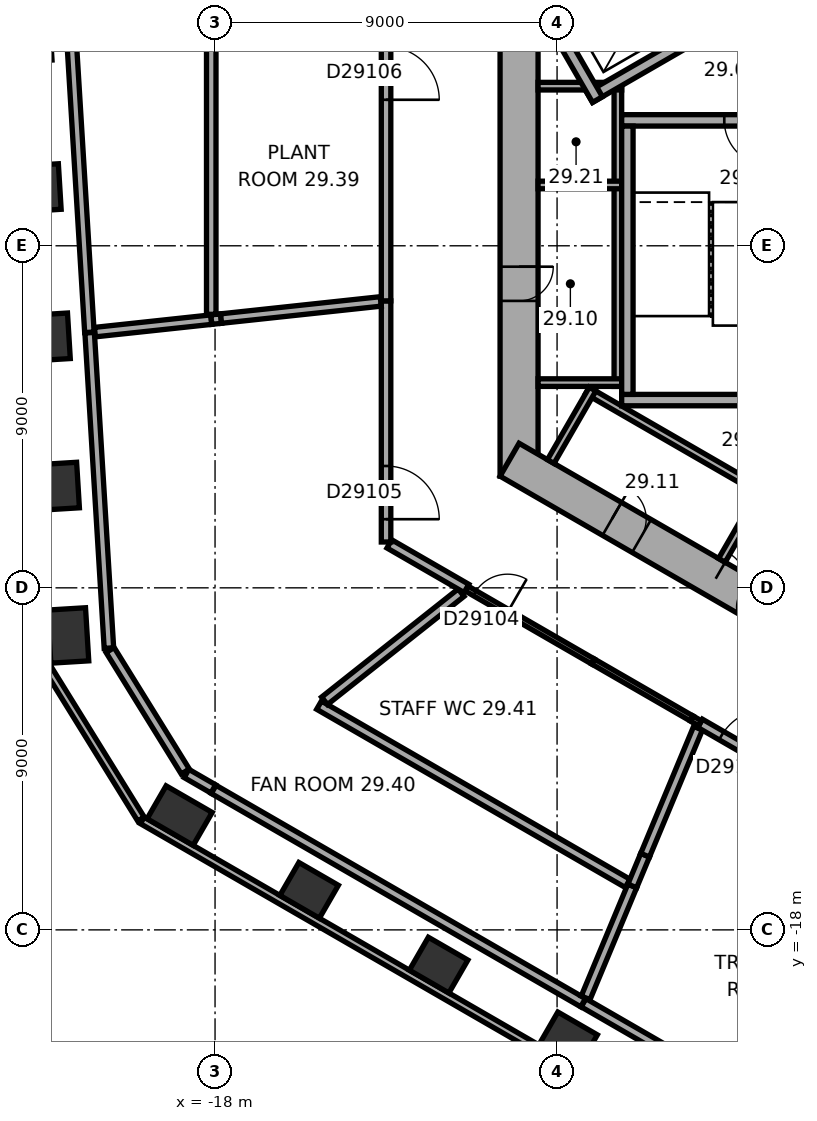
"""IFC4 building model, lengths in metres.
Left out: names, types, materials, properties, quantities, classifications, styles, units other than length and angle.
Written with IfcOpenShell. Run it as: python <this file> out.ifc"""

import sys

from ifc_helpers import new_model, si_unit, direction, frame, frame_2d, origin, origin_2d, place, context, subcontext, project, spatial, rectangle, extrude, element, fill, save


model = new_model("IFC4")
c1 = context("Model", 3, precision=1e-05, world=origin(), true_north=direction((0.0, 1.0)))
c2 = subcontext(c1, "Body", "Model", "MODEL_VIEW")
j1 = project(units=[si_unit("LENGTHUNIT", "METRE"), si_unit("PLANEANGLEUNIT", "RADIAN")], contexts=[c1])
p1 = place(None, origin())
s1 = spatial("IfcSite", under=j1, at=p1, CompositionType="ELEMENT")
p2 = place(p1, origin())
s2 = spatial("IfcBuilding", under=s1, at=p2, CompositionType="ELEMENT")
p3 = place(p2, frame((0.0, 0.0, 119.9)))
s3 = spatial("IfcBuildingStorey", under=s2, at=p3, CompositionType="ELEMENT", Elevation=119.9)
for number, where, z_axis, x_axis in (
    (1, (-22.826, 5.456, 0.0), (0.0, 0.0, 1.0), (0.061, -0.998, 0.0)),
    (2, (-22.585, 1.529, 0.0), (0.0, 0.0, 1.0), (0.061, -0.998, 0.0)),
    (3, (-22.345, -2.399, 0.0), (0.0, 0.0, 1.0), (0.061, -0.998, 0.0)),
    (4, (-22.105, -6.326, 0.0), (0.0, 0.0, 1.0), (0.061, -0.998, 0.0)),
):
    element("IfcColumn", number, at=place(p3, frame(where, z_axis=z_axis, x_axis=x_axis)), inside=s3, PredefinedType="COLUMN", context=c2, shape_type="SweptSolid", body=[
        extrude(rectangle(XDim=1.2, YDim=1.0, at=origin_2d()), origin(), (0.0, 0.0, 1.0), 4.5),
    ])
for number, where, z_axis, x_axis in (
    (5, (-21.865, -10.253, 0.0), (0.0, 0.0, 1.0), (0.061, -0.998, 0.0)),
    (6, (-18.932, -14.993, 0.0), (0.0, 0.0, 1.0), (0.866, -0.5, 0.0)),
):
    element("IfcColumn", number, at=place(p3, frame(where, z_axis=z_axis, x_axis=x_axis)), inside=s3, PredefinedType="COLUMN", context=c2, shape_type="SweptSolid", body=[
        extrude(rectangle(XDim=1.4, YDim=1.0, at=origin_2d()), origin(), (0.0, 0.0, 1.0), 4.5),
    ])
for number, where, z_axis, x_axis in (
    (7, (-15.524, -16.96, 0.0), (0.0, 0.0, 1.0), (0.866, -0.5, 0.0)),
    (8, (-12.117, -18.927, 0.0), (0.0, 0.0, 1.0), (0.866, -0.5, 0.0)),
    (9, (-8.71, -20.895, 0.0), (0.0, 0.0, 1.0), (0.866, -0.5, 0.0)),
):
    element("IfcColumn", number, at=place(p3, frame(where, z_axis=z_axis, x_axis=x_axis)), inside=s3, PredefinedType="COLUMN", context=c2, shape_type="SweptSolid", body=[
        extrude(rectangle(XDim=1.2, YDim=1.0, at=origin_2d()), origin(), (0.0, 0.0, 1.0), 4.5),
    ])
p4 = place(p3, frame((-10.0, 6.062, 0.0), z_axis=(0.0, 0.0, 1.0), x_axis=(0.0, -1.0, 0.0)))
e10 = element("IfcWall", 10, at=p4, inside=s3, PredefinedType="SHEAR", context=c2, shape_type="SweptSolid", body=[
    extrude(rectangle(XDim=12.125, YDim=1.0, at=frame_2d((6.062, 0.0))), origin(), (0.0, 0.0, 1.0), 4.5),
])
p5 = place(p4, frame((6.612, 0.0, 0.0)))
e11 = element("IfcOpeningElement", 11, at=p5, cuts=e10, PredefinedType="OPENING", context=c2, shape_type="SweptSolid", body=[
    extrude(rectangle(XDim=0.9, YDim=2.1, at=frame_2d((0.45, 1.05))), frame((0.0, 0.51, 0.0), z_axis=(0.0, -1.0, 0.0), x_axis=(1.0, 0.0, 0.0)), (0.0, 0.0, 1.0), 1.02),
])
p6 = place(p3, frame((-10.25, -5.629, 0.0), z_axis=(0.0, 0.0, 1.0), x_axis=(0.866022616891, -0.50000482701, 0.0)))
e12 = element("IfcWall", 12, at=p6, inside=s3, PredefinedType="SHEAR", context=c2, shape_type="SweptSolid", body=[
    extrude(rectangle(XDim=12.125, YDim=1.0, at=frame_2d((6.062, 0.0))), origin(), (0.0, 0.0, 1.0), 4.5),
])
p7 = place(p6, frame((6.262, 0.0, 0.0)))
e13 = element("IfcOpeningElement", 13, at=p7, cuts=e12, PredefinedType="OPENING", context=c2, shape_type="SweptSolid", body=[
    extrude(rectangle(XDim=1.5, YDim=2.1, at=frame_2d((0.75, 1.05))), frame((0.0, 0.51, 0.0), z_axis=(0.0, -1.0, 0.0), x_axis=(1.0, 0.0, 0.0)), (0.0, 0.0, 1.0), 1.02),
])
p8 = place(p6, frame((3.112, 0.0, 0.0)))
e14 = element("IfcOpeningElement", 14, at=p8, cuts=e12, PredefinedType="OPENING", context=c2, shape_type="SweptSolid", body=[
    extrude(rectangle(XDim=0.9, YDim=2.1, at=frame_2d((0.45, 1.05))), frame((0.0, 0.51, 0.0), z_axis=(0.0, -1.0, 0.0), x_axis=(1.0, 0.0, 0.0)), (0.0, 0.0, 1.0), 1.02),
])
p9 = place(p3, frame((-22.401, -11.122, 0.0), z_axis=(0.0, 0.0, 1.0), x_axis=(0.526197679914, -0.850362276711, 0.0)))
e15 = element("IfcWall", 15, at=p9, inside=s3, PredefinedType="STANDARD", context=c2, shape_type="SweptSolid", body=[
    extrude(rectangle(XDim=4.66, YDim=0.2, at=frame_2d((2.33, 0.0))), origin(), (0.0, 0.0, 1.0), 4.5),
])
p10 = place(p3, frame((-19.914, -15.119, 0.0), z_axis=(0.0, 0.0, 1.0), x_axis=(0.866025418898, -0.499999973822, 0.0)))
e16 = element("IfcWall", 16, at=p10, inside=s3, PredefinedType="STANDARD", context=c2, shape_type="SweptSolid", body=[
    extrude(rectangle(XDim=21.246, YDim=0.2, at=frame_2d((10.623, 0.0))), origin(), (0.0, 0.0, 1.0), 4.5),
])
p11 = place(p3, frame((-7.4, 4.3, 0.0), z_axis=(0.0, 0.0, 1.0), x_axis=(0.0, -1.0, 0.0)))
e17 = element("IfcWall", 17, at=p11, inside=s3, PredefinedType="PARTITIONING", context=c2, shape_type="SweptSolid", body=[
    extrude(rectangle(XDim=8.0, YDim=0.2, at=frame_2d((4.0, 0.0))), origin(), (0.0, 0.0, 1.0), 4.22),
])
for number, where, z_axis, x_axis in (
    (18, (-7.3, 4.2, 0.0), (0.0, 0.0, 1.0), (-1.0, 0.0, 0.0)),
    (19, (-7.3, 1.6, 0.0), (0.0, 0.0, 1.0), (-1.0, 0.0, 0.0)),
    (20, (-7.3, -3.6, 0.0), (0.0, 0.0, 1.0), (-1.0, 0.0, 0.0)),
):
    element("IfcWall", number, at=place(p3, frame(where, z_axis=z_axis, x_axis=x_axis)), inside=s3, PredefinedType="PARTITIONING", context=c2, shape_type="SweptSolid", body=[
        extrude(rectangle(XDim=2.2, YDim=0.2, at=frame_2d((1.1, 0.0))), origin(), (0.0, 0.0, 1.0), 4.22),
    ])
p12 = place(p3, frame((-8.203, -3.809, 0.0), z_axis=(0.0, 0.0, 1.0), x_axis=(0.866028230842, -0.499995103361, 0.0)))
e21 = element("IfcWall", 21, at=p12, inside=s3, PredefinedType="PARTITIONING", context=c2, shape_type="SweptSolid", body=[
    extrude(rectangle(XDim=5.4, YDim=0.2, at=frame_2d((2.7, 0.0))), origin(), (0.0, 0.0, 1.0), 4.22),
])
p13 = place(p3, frame((-8.067, -3.772, 0.0), z_axis=(0.0, 0.0, 1.0), x_axis=(-0.50002983664, -0.866008176907, 0.0)))
e22 = element("IfcWall", 22, at=p13, inside=s3, PredefinedType="PARTITIONING", context=c2, shape_type="SweptSolid", body=[
    extrude(rectangle(XDim=2.2, YDim=0.2, at=frame_2d((1.1, 0.0))), origin(), (0.0, 0.0, 1.0), 4.22),
])
p14 = place(p3, frame((-3.563, -6.372, 0.0), z_axis=(0.0, 0.0, 1.0), x_axis=(-0.499994660107, -0.866028486751, 0.0)))
e23 = element("IfcWall", 23, at=p14, inside=s3, PredefinedType="PARTITIONING", context=c2, shape_type="SweptSolid", body=[
    extrude(rectangle(XDim=2.2, YDim=0.2, at=frame_2d((1.1, 0.0))), origin(), (0.0, 0.0, 1.0), 4.22),
])
p15 = place(p3, frame((-2.6, 3.3, 0.0), z_axis=(0.0, 0.0, 1.0), x_axis=(-1.0, 0.0, 0.0)))
e24 = element("IfcWall", 24, at=p15, inside=s3, PredefinedType="SHEAR", context=c2, shape_type="SweptSolid", body=[
    extrude(rectangle(XDim=4.7, YDim=0.3, at=frame_2d((2.35, 0.0))), origin(), (0.0, 0.0, 1.0), 4.22),
])
p16 = place(p15, frame((0.8, 0.0, 0.0)))
e25 = element("IfcOpeningElement", 25, at=p16, cuts=e24, PredefinedType="OPENING", context=c2, shape_type="SweptSolid", body=[
    extrude(rectangle(XDim=1.2, YDim=2.1, at=frame_2d((0.6, 1.05))), frame((0.0, 0.16, 0.0), z_axis=(0.0, -1.0, 0.0), x_axis=(1.0, 0.0, 0.0)), (0.0, 0.0, 1.0), 0.32),
])
p17 = place(p3, frame((-2.6, -4.06, 0.0), z_axis=(0.0, 0.0, 1.0), x_axis=(-1.0, 0.0, 0.0)))
e26 = element("IfcWall", 26, at=p17, inside=s3, PredefinedType="SHEAR", context=c2, shape_type="SweptSolid", body=[
    extrude(rectangle(XDim=4.7, YDim=0.3, at=frame_2d((2.35, 0.0))), origin(), (0.0, 0.0, 1.0), 4.22),
])
p18 = place(p3, frame((-7.15, 3.15, 0.0), z_axis=(0.0, 0.0, 1.0), x_axis=(0.0, -1.0, 0.0)))
e27 = element("IfcWall", 27, at=p18, inside=s3, PredefinedType="SHEAR", context=c2, shape_type="SweptSolid", body=[
    extrude(rectangle(XDim=7.06, YDim=0.3, at=frame_2d((3.53, 0.0))), origin(), (0.0, 0.0, 1.0), 4.22),
])
p19 = place(p3, frame((-5.24, 5.577, 0.0), z_axis=(0.0, 0.0, 1.0), x_axis=(-0.866014461049, -0.500018952895, 0.0)))
e28 = element("IfcWall", 28, at=p19, inside=s3, PredefinedType="SHEAR", context=c2, shape_type="SweptSolid", body=[
    extrude(rectangle(XDim=3.35, YDim=0.3, at=frame_2d((1.675, 0.0))), origin(), (0.0, 0.0, 1.0), 4.22),
])
p20 = place(p3, frame((-7.937, 3.847, 0.0), z_axis=(0.0, 0.0, 1.0), x_axis=(-0.50002983664, 0.866008176907, 0.0)))
e29 = element("IfcWall", 29, at=p20, inside=s3, PredefinedType="SHEAR", context=c2, shape_type="SweptSolid", body=[
    extrude(rectangle(XDim=2.2, YDim=0.3, at=frame_2d((1.1, 0.0))), origin(), (0.0, 0.0, 1.0), 4.22),
])
p21 = place(p3, frame((-1.071, -24.093, 0.0), z_axis=(0.0, 0.0, 1.0), x_axis=(-0.866026859388, 0.499997478812, 0.0)))
e30 = element("IfcWall", 30, at=p21, inside=s3, PredefinedType="SOLIDWALL", context=c2, shape_type="SweptSolid", body=[
    extrude(rectangle(XDim=8.35, YDim=0.25, at=frame_2d((4.175, 0.0))), origin(), (0.0, 0.0, 1.0), 3.72),
])
p22 = place(p3, frame((-8.315, -19.916, 0.0), z_axis=(0.0, 0.0, 1.0), x_axis=(-0.866035647186, 0.499982257488, 0.0)))
e31 = element("IfcWall", 31, at=p22, inside=s3, PredefinedType="SOLIDWALL", context=c2, shape_type="SweptSolid", body=[
    extrude(rectangle(XDim=11.226, YDim=0.25, at=frame_2d((5.613, 0.0))), origin(), (0.0, 0.0, 1.0), 3.72),
])
p23 = place(p3, frame((-8.249, -19.788, 0.0), z_axis=(0.0, 0.0, 1.0), x_axis=(0.384822050218, 0.922990785255, 0.0)))
e32 = element("IfcWall", 32, at=p23, inside=s3, PredefinedType="SOLIDWALL", context=c2, shape_type="SweptSolid", body=[
    extrude(rectangle(XDim=3.187, YDim=0.25, at=frame_2d((1.594, 0.0))), origin(), (0.0, 0.0, 1.0), 3.2),
])
p24 = place(p3, frame((-7.143, -16.776, 0.0), z_axis=(0.0, 0.0, 1.0), x_axis=(-0.866010407637, 0.500025973189, 0.0)))
e33 = element("IfcWall", 33, at=p24, inside=s3, PredefinedType="SOLIDWALL", context=c2, shape_type="SweptSolid", body=[
    extrude(rectangle(XDim=9.376, YDim=0.25, at=frame_2d((4.688, 0.0))), origin(), (0.0, 0.0, 1.0), 4.22),
])
p25 = place(p3, frame((-6.684, -16.034, 0.0), z_axis=(0.0, 0.0, 1.0), x_axis=(-0.384892223144, -0.922961524964, 0.0)))
e34 = element("IfcWall", 34, at=p25, inside=s3, PredefinedType="SOLIDWALL", context=c2, shape_type="SweptSolid", body=[
    extrude(rectangle(XDim=0.877, YDim=0.25, at=frame_2d((0.438, 0.0))), origin(), (0.0, 0.0, 1.0), 3.2),
])
p26 = place(p3, frame((-6.684, -16.034, 0.0), z_axis=(0.0, 0.0, 1.0), x_axis=(0.384715971376, 0.923035005495, 0.0)))
e35 = element("IfcWall", 35, at=p26, inside=s3, PredefinedType="SOLIDWALL", context=c2, shape_type="SweptSolid", body=[
    extrude(rectangle(XDim=3.619, YDim=0.25, at=frame_2d((1.81, 0.0))), origin(), (0.0, 0.0, 1.0), 3.2),
])
p27 = place(p3, frame((0.0, -15.588, 0.0), z_axis=(0.0, 0.0, 1.0), x_axis=(-0.866023574055, 0.500003169172, 0.0)))
e36 = element("IfcWall", 36, at=p27, inside=s3, PredefinedType="SOLIDWALL", context=c2, shape_type="SweptSolid", body=[
    extrude(rectangle(XDim=6.048, YDim=0.25, at=frame_2d((3.024, 0.0))), origin(), (0.0, 0.0, 1.0), 4.22),
])
p28 = place(p27, frame((3.998, 0.0, 0.0)))
e37 = element("IfcOpeningElement", 37, at=p28, cuts=e36, PredefinedType="OPENING", context=c2, shape_type="SweptSolid", body=[
    extrude(rectangle(XDim=1.4, YDim=2.1, at=frame_2d((0.7, 1.05))), frame((0.0, 0.135, 0.0), z_axis=(0.0, -1.0, 0.0), x_axis=(1.0, 0.0, 0.0)), (0.0, 0.0, 1.0), 0.27),
])
p29 = place(p3, frame((-18.046, -14.292, 0.0), z_axis=(0.0, 0.0, 1.0), x_axis=(-0.865925719893, 0.500172617831, 0.0)))
e38 = element("IfcWall", 38, at=p29, inside=s3, PredefinedType="SOLIDWALL", context=c2, shape_type="SweptSolid", body=[
    extrude(rectangle(XDim=0.814, YDim=0.25, at=frame_2d((0.407, 0.0))), origin(), (0.0, 0.0, 1.0), 4.22),
])
p30 = place(p3, frame((-18.782, -13.833, 0.0), z_axis=(0.0, 0.0, 1.0), x_axis=(-0.526240599462, 0.850335716925, 0.0)))
e39 = element("IfcWall", 39, at=p30, inside=s3, PredefinedType="SOLIDWALL", context=c2, shape_type="SweptSolid", body=[
    extrude(rectangle(XDim=3.76, YDim=0.25, at=frame_2d((1.88, 0.0))), origin(), (0.0, 0.0, 1.0), 4.22),
])
p31 = place(p3, frame((-5.238, -12.564, 0.0), z_axis=(0.0, 0.0, 1.0), x_axis=(-0.866234801039, 0.4996371378, 0.0)))
e40 = element("IfcWall", 40, at=p31, inside=s3, PredefinedType="PARTITIONING", context=c2, shape_type="SweptSolid", body=[
    extrude(rectangle(XDim=0.248, YDim=0.15, at=frame_2d((0.124, 0.0))), origin(), (0.0, 0.0, 1.0), 4.22),
])
p32 = place(p3, frame((-5.452, -12.441, 0.0), z_axis=(0.0, 0.0, 1.0), x_axis=(-0.866037998184, 0.499978185225, 0.0)))
e41 = element("IfcWall", 41, at=p32, inside=s3, PredefinedType="PARTITIONING", context=c2, shape_type="SweptSolid", body=[
    extrude(rectangle(XDim=3.003, YDim=0.15, at=frame_2d((1.501, 0.0))), origin(), (0.0, 0.0, 1.0), 4.22),
])
p33 = place(p3, frame((-15.119, -11.973, 0.0), z_axis=(0.0, 0.0, 1.0), x_axis=(0.783935646565, 0.62084209107, 0.0)))
e42 = element("IfcWall", 42, at=p33, inside=s3, PredefinedType="SOLIDWALL", context=c2, shape_type="SweptSolid", body=[
    extrude(rectangle(XDim=4.584, YDim=0.25, at=frame_2d((2.292, 0.0))), origin(), (0.0, 0.0, 1.0), 3.2),
])
p34 = place(p3, frame((-8.052, -10.939, 0.0), z_axis=(0.0, 0.0, 1.0), x_axis=(-0.865989037086, 0.500062983681, 0.0)))
e43 = element("IfcWall", 43, at=p34, inside=s3, PredefinedType="PARTITIONING", context=c2, shape_type="SweptSolid", body=[
    extrude(rectangle(XDim=3.848, YDim=0.15, at=frame_2d((1.924, 0.0))), origin(), (0.0, 0.0, 1.0), 4.22),
])
p35 = place(p34, frame((2.598, 0.0, 0.0)))
e44 = element("IfcOpeningElement", 44, at=p35, cuts=e43, PredefinedType="OPENING", context=c2, shape_type="SweptSolid", body=[
    extrude(rectangle(XDim=1.0, YDim=2.1, at=frame_2d((0.5, 1.05))), frame((0.0, 0.085, 0.0), z_axis=(0.0, -1.0, 0.0), x_axis=(1.0, 0.0, 0.0)), (0.0, 0.0, 1.0), 0.17),
])
p36 = place(p3, frame((-20.792, -10.585, 0.0), z_axis=(0.0, 0.0, 1.0), x_axis=(-0.061050954365, 0.998134650722, 0.0)))
e45 = element("IfcWall", 45, at=p36, inside=s3, PredefinedType="SOLIDWALL", context=c2, shape_type="SweptSolid", body=[
    extrude(rectangle(XDim=8.314, YDim=0.25, at=frame_2d((4.157, 0.0))), origin(), (0.0, 0.0, 1.0), 3.72),
])
p37 = place(p3, frame((-13.413, -7.844, 0.0), z_axis=(0.0, 0.0, 1.0), x_axis=(0.866015509187, -0.500017137554, 0.0)))
e46 = element("IfcWall", 46, at=p37, inside=s3, PredefinedType="SOLIDWALL", context=c2, shape_type="SweptSolid", body=[
    extrude(rectangle(XDim=2.343, YDim=0.25, at=frame_2d((1.171, 0.0))), origin(), (0.0, 0.0, 1.0), 4.22),
])
p38 = place(p3, frame((-13.5, -7.794, 0.0), z_axis=(0.0, 0.0, 1.0), x_axis=(0.0, 1.0, 0.0)))
e47 = element("IfcWall", 47, at=p38, inside=s3, PredefinedType="SOLIDWALL", context=c2, shape_type="SweptSolid", body=[
    extrude(rectangle(XDim=6.345, YDim=0.25, at=frame_2d((3.172, 0.0))), origin(), (0.0, 0.0, 1.0), 4.22),
])
p39 = place(p38, frame((0.6, 0.0, 0.0)))
e48 = element("IfcOpeningElement", 48, at=p39, cuts=e47, PredefinedType="OPENING", context=c2, shape_type="SweptSolid", body=[
    extrude(rectangle(XDim=1.4, YDim=2.1, at=frame_2d((0.7, 1.05))), frame((0.0, 0.135, 0.0), z_axis=(0.0, -1.0, 0.0), x_axis=(1.0, 0.0, 0.0)), (0.0, 0.0, 1.0), 0.27),
])
p40 = place(p3, frame((-21.306, -2.277, 0.0), z_axis=(0.0, 0.0, 1.0), x_axis=(-0.061026930585, 0.998136119847, 0.0)))
e49 = element("IfcWall", 49, at=p40, inside=s3, PredefinedType="SOLIDWALL", context=c2, shape_type="SweptSolid", body=[
    extrude(rectangle(XDim=11.226, YDim=0.25, at=frame_2d((5.613, 0.0))), origin(), (0.0, 0.0, 1.0), 3.72),
])
p41 = place(p3, frame((-21.161, -2.271, 0.0), z_axis=(0.0, 0.0, 1.0), x_axis=(0.99429444282, 0.106670337847, 0.0)))
e50 = element("IfcWall", 50, at=p41, inside=s3, PredefinedType="SOLIDWALL", context=c2, shape_type="SweptSolid", body=[
    extrude(rectangle(XDim=3.078, YDim=0.25, at=frame_2d((1.539, 0.0))), origin(), (0.0, 0.0, 1.0), 3.2),
])
p42 = place(p3, frame((-17.842, -1.915, 0.0), z_axis=(0.0, 0.0, 1.0), x_axis=(-0.994157722511, -0.107937124158, 0.0)))
e51 = element("IfcWall", 51, at=p42, inside=s3, PredefinedType="SOLIDWALL", context=c2, shape_type="SweptSolid", body=[
    extrude(rectangle(XDim=0.258, YDim=0.25, at=frame_2d((0.129, 0.0))), origin(), (0.0, 0.0, 1.0), 4.22),
])
p43 = place(p3, frame((-17.842, -1.915, 0.0), z_axis=(0.0, 0.0, 1.0), x_axis=(0.994286185639, 0.106747276539, 0.0)))
e52 = element("IfcWall", 52, at=p43, inside=s3, PredefinedType="SOLIDWALL", context=c2, shape_type="SweptSolid", body=[
    extrude(rectangle(XDim=4.227, YDim=0.25, at=frame_2d((2.113, 0.0))), origin(), (0.0, 0.0, 1.0), 3.2),
])
p44 = place(p3, frame((-18.1, -1.803, 0.0), z_axis=(0.0, 0.0, 1.0), x_axis=(0.0, 1.0, 0.0)))
e53 = element("IfcWall", 53, at=p44, inside=s3, PredefinedType="SOLIDWALL", context=c2, shape_type="SweptSolid", body=[
    extrude(rectangle(XDim=9.166, YDim=0.25, at=frame_2d((4.583, 0.0))), origin(), (0.0, 0.0, 1.0), 4.22),
])
p45 = place(p3, frame((-13.5, -1.449, 0.0), z_axis=(0.0, 0.0, 1.0), x_axis=(0.0, 1.0, 0.0)))
e54 = element("IfcWall", 54, at=p45, inside=s3, PredefinedType="SOLIDWALL", context=c2, shape_type="SweptSolid", body=[
    extrude(rectangle(XDim=6.941, YDim=0.25, at=frame_2d((3.47, 0.0))), origin(), (0.0, 0.0, 1.0), 4.22),
])
p46 = place(p45, frame((5.291, 0.0, 0.0)))
e55 = element("IfcOpeningElement", 55, at=p46, cuts=e54, PredefinedType="OPENING", context=c2, shape_type="SweptSolid", body=[
    extrude(rectangle(XDim=1.4, YDim=2.1, at=frame_2d((0.7, 1.05))), frame((0.0, 0.135, 0.0), z_axis=(0.0, -1.0, 0.0), x_axis=(1.0, 0.0, 0.0)), (0.0, 0.0, 1.0), 0.27),
])
p47 = place(p7, origin())
e56 = element("IfcDoor", 56, at=p47, inside=s3, OperationType="DOUBLE_DOOR_SINGLE_SWING", PredefinedType="DOOR", context=c2, shape_type="SweptSolid", body=[
    extrude(rectangle(XDim=1.5, YDim=2.1, at=frame_2d((0.75, 1.05))), frame((0.0, 0.025, 0.0), z_axis=(0.0, -1.0, 0.0), x_axis=(1.0, 0.0, 0.0)), (0.0, 0.0, 1.0), 0.05),
])
fill(e13, e56)
p48 = place(p16, origin())
e57 = element("IfcDoor", 57, at=p48, inside=s3, OperationType="SINGLE_SWING_RIGHT", PredefinedType="DOOR", context=c2, shape_type="SweptSolid", body=[
    extrude(rectangle(XDim=1.2, YDim=2.1, at=frame_2d((0.6, 1.05))), frame((0.0, 0.025, 0.0), z_axis=(0.0, -1.0, 0.0), x_axis=(1.0, 0.0, 0.0)), (0.0, 0.0, 1.0), 0.05),
])
fill(e25, e57)
p49 = place(p5, origin())
e58 = element("IfcDoor", 58, at=p49, inside=s3, OperationType="SINGLE_SWING_LEFT", PredefinedType="DOOR", context=c2, shape_type="SweptSolid", body=[
    extrude(rectangle(XDim=0.9, YDim=2.1, at=frame_2d((0.45, 1.05))), frame((0.0, 0.025, 0.0), z_axis=(0.0, -1.0, 0.0), x_axis=(1.0, 0.0, 0.0)), (0.0, 0.0, 1.0), 0.05),
])
fill(e11, e58)
p50 = place(p8, origin())
e59 = element("IfcDoor", 59, at=p50, inside=s3, OperationType="SINGLE_SWING_LEFT", PredefinedType="DOOR", context=c2, shape_type="SweptSolid", body=[
    extrude(rectangle(XDim=0.9, YDim=2.1, at=frame_2d((0.45, 1.05))), frame((0.0, 0.025, 0.0), z_axis=(0.0, -1.0, 0.0), x_axis=(1.0, 0.0, 0.0)), (0.0, 0.0, 1.0), 0.05),
])
fill(e14, e59)
p51 = place(p28, origin())
e60 = element("IfcDoor", 60, at=p51, inside=s3, OperationType="SINGLE_SWING_LEFT", PredefinedType="DOOR", context=c2, shape_type="SweptSolid", body=[
    extrude(rectangle(XDim=1.4, YDim=2.1, at=frame_2d((0.7, 1.05))), frame((0.0, 0.025, 0.0), z_axis=(0.0, -1.0, 0.0), x_axis=(1.0, 0.0, 0.0)), (0.0, 0.0, 1.0), 0.05),
])
fill(e37, e60)
p52 = place(p35, origin())
e61 = element("IfcDoor", 61, at=p52, inside=s3, OperationType="SINGLE_SWING_LEFT", PredefinedType="DOOR", context=c2, shape_type="SweptSolid", body=[
    extrude(rectangle(XDim=1.0, YDim=2.1, at=frame_2d((0.5, 1.05))), frame((0.0, 0.025, 0.0), z_axis=(0.0, -1.0, 0.0), x_axis=(1.0, 0.0, 0.0)), (0.0, 0.0, 1.0), 0.05),
])
fill(e44, e61)
p53 = place(p39, origin())
e62 = element("IfcDoor", 62, at=p53, inside=s3, OperationType="SINGLE_SWING_LEFT", PredefinedType="DOOR", context=c2, shape_type="SweptSolid", body=[
    extrude(rectangle(XDim=1.4, YDim=2.1, at=frame_2d((0.7, 1.05))), frame((0.0, 0.025, 0.0), z_axis=(0.0, -1.0, 0.0), x_axis=(1.0, 0.0, 0.0)), (0.0, 0.0, 1.0), 0.05),
])
fill(e48, e62)
p54 = place(p46, origin())
e63 = element("IfcDoor", 63, at=p54, inside=s3, OperationType="SINGLE_SWING_LEFT", PredefinedType="DOOR", context=c2, shape_type="SweptSolid", body=[
    extrude(rectangle(XDim=1.4, YDim=2.1, at=frame_2d((0.7, 1.05))), frame((0.0, 0.025, 0.0), z_axis=(0.0, -1.0, 0.0), x_axis=(1.0, 0.0, 0.0)), (0.0, 0.0, 1.0), 0.05),
])
fill(e55, e63)
save(model, sys.argv[1])
